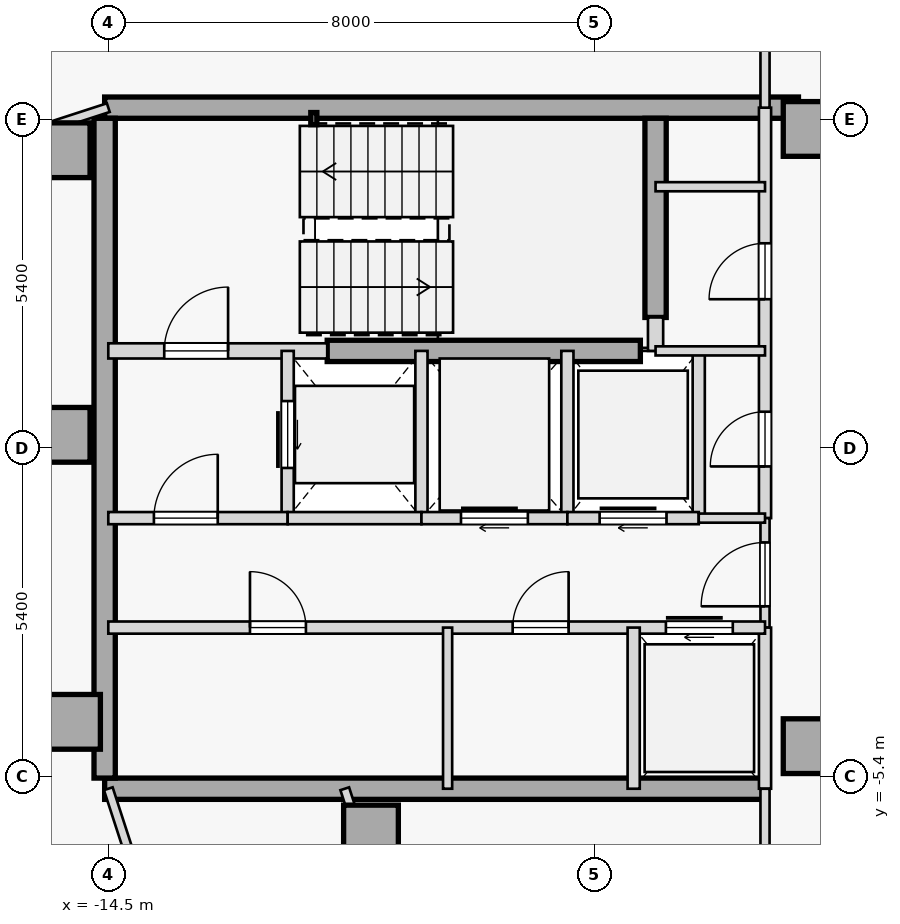
"""IFC4 building model, lengths in metres.
Left out: names, types, materials, properties, quantities, classifications, styles, units other than length and angle.
Written with IfcOpenShell. Run it as: python <this file> out.ifc"""

import sys

from ifc_helpers import new_model, si_unit, direction, frame, frame_2d, origin, origin_2d, place, context, subcontext, project, spatial, rectangle, hollow_rectangle, extrude, element, fill, save


model = new_model("IFC4")
c1 = context("Model", 3, precision=1e-05, world=origin(), true_north=direction((0.0, 1.0)))
c2 = subcontext(c1, "Body", "Model", "MODEL_VIEW")
j1 = project(units=[si_unit("LENGTHUNIT", "METRE"), si_unit("PLANEANGLEUNIT", "RADIAN")], contexts=[c1])
p1 = place(None, origin())
s1 = spatial("IfcSite", under=j1, at=p1, CompositionType="ELEMENT")
p2 = place(p1, origin())
s2 = spatial("IfcBuilding", under=s1, at=p2, CompositionType="ELEMENT")
p3 = place(p2, frame((0.0, 0.0, 231.0)))
s3 = spatial("IfcBuildingStorey", under=s2, at=p3, CompositionType="ELEMENT", Elevation=231.0)
for number, where, z_axis, x_axis in (
    (1, (-15.25, 4.9, 0.0), (0.0, 0.0, 1.0), (1.0, 0.0, 0.0)),
    (2, (-15.25, 0.22, 0.0), (0.0, 0.0, 1.0), (1.0, 0.0, 0.0)),
    (3, (-15.08, -4.5, 0.0), (0.0, 0.0, 1.0), (1.0, 0.0, 0.0)),
    (4, (-10.18, -6.32, 0.0), (0.0, 0.0, 1.0), (1.0, 0.0, 0.0)),
    (5, (-2.95, -4.9, 0.0), (0.0, 0.0, 1.0), (1.0, 0.0, 0.0)),
    (6, (-2.95, 5.25, 0.0), (0.0, 0.0, 1.0), (1.0, 0.0, 0.0)),
):
    element("IfcColumn", number, at=place(p3, frame(where, z_axis=z_axis, x_axis=x_axis)), inside=s3, PredefinedType="COLUMN", context=c2, shape_type="SweptSolid", body=[
        extrude(rectangle(XDim=0.9, YDim=0.9, at=origin_2d()), origin(), (0.0, 0.0, 1.0), 3.35),
    ])
p4 = place(p3, frame((-14.56, 5.6, 0.0), z_axis=(0.0, 0.0, 1.0), x_axis=(1.0, 0.0, 0.0)))
e7 = element("IfcWall", 7, at=p4, inside=s3, PredefinedType="SHEAR", context=c2, shape_type="SweptSolid", body=[
    extrude(rectangle(XDim=11.41, YDim=0.35, at=frame_2d((5.705, 0.0))), origin(), (0.0, 0.0, 1.0), 3.125),
])
p5 = place(p3, frame((-14.56, -5.6, 0.0), z_axis=(0.0, 0.0, 1.0), x_axis=(1.0, 0.0, 0.0)))
e8 = element("IfcWall", 8, at=p5, inside=s3, PredefinedType="SHEAR", context=c2, shape_type="SweptSolid", body=[
    extrude(rectangle(XDim=10.86, YDim=0.35, at=frame_2d((5.43, 0.0))), origin(), (0.0, 0.0, 1.0), 3.125),
])
p6 = place(p3, frame((-14.56, -5.425, 0.0), z_axis=(0.0, 0.0, 1.0), x_axis=(0.0, 1.0, 0.0)))
e9 = element("IfcWall", 9, at=p6, inside=s3, PredefinedType="SHEAR", context=c2, shape_type="SweptSolid", body=[
    extrude(rectangle(XDim=10.85, YDim=0.35, at=frame_2d((5.425, 0.0))), origin(), (0.0, 0.0, 1.0), 3.125),
])
p7 = place(p3, frame((-5.5, 2.15, 0.0), z_axis=(0.0, 0.0, 1.0), x_axis=(0.0, 1.0, 0.0)))
e10 = element("IfcWall", 10, at=p7, inside=s3, PredefinedType="SHEAR", context=c2, shape_type="SweptSolid", body=[
    extrude(rectangle(XDim=3.275, YDim=0.35, at=frame_2d((1.638, 0.0))), origin(), (0.0, 0.0, 1.0), 3.125),
])
p8 = place(p3, frame((-10.9, 1.6, 0.0), z_axis=(0.0, 0.0, 1.0), x_axis=(1.0, 0.0, 0.0)))
e11 = element("IfcWall", 11, at=p8, inside=s3, PredefinedType="SHEAR", context=c2, shape_type="SweptSolid", body=[
    extrude(rectangle(XDim=5.15, YDim=0.35, at=frame_2d((2.575, 0.0))), origin(), (0.0, 0.0, 1.0), 3.125),
])
p9 = place(p3, frame((-11.12, 5.42, 0.0), z_axis=(0.0, 0.0, 1.0), x_axis=(1.0, 0.0, 0.0)))
e12 = element("IfcColumn", 12, at=p9, inside=s3, PredefinedType="COLUMN", context=c2, shape_type="SweptSolid", body=[
    extrude(hollow_rectangle(XDim=0.1, YDim=0.2, WallThickness=0.008, at=origin_2d()), origin(), (0.0, 0.0, 1.0), 3.35),
])
p10 = place(p3, frame((-14.5, 1.6, 0.0), z_axis=(0.0, 0.0, 1.0), x_axis=(1.0, 0.0, 0.0)))
e13 = element("IfcWall", 13, at=p10, inside=s3, PredefinedType="STANDARD", context=c2, shape_type="SweptSolid", body=[
    extrude(rectangle(XDim=3.6, YDim=0.25, at=frame_2d((1.8, 0.0))), origin(), (0.0, 0.0, 1.0), 3.125),
])
p11 = place(p10, frame((0.92, 0.0, 0.0)))
e14 = element("IfcOpeningElement", 14, at=p11, cuts=e13, PredefinedType="OPENING", context=c2, shape_type="SweptSolid", body=[
    extrude(rectangle(XDim=1.05, YDim=2.15, at=frame_2d((0.525, 1.075))), frame((0.0, 0.135, 0.0), z_axis=(0.0, -1.0, 0.0), x_axis=(1.0, 0.0, 0.0)), (0.0, 0.0, 1.0), 0.27),
])
p12 = place(p3, frame((-5.5, 1.6, 0.0), z_axis=(0.0, 0.0, 1.0), x_axis=(0.0, 1.0, 0.0)))
e15 = element("IfcWall", 15, at=p12, inside=s3, PredefinedType="STANDARD", context=c2, shape_type="SweptSolid", body=[
    extrude(rectangle(XDim=0.55, YDim=0.25, at=frame_2d((0.275, 0.0))), origin(), (0.0, 0.0, 1.0), 3.125),
])
p13 = place(p3, frame((-3.7, -1.15, 0.0), z_axis=(0.0, 0.0, 1.0), x_axis=(0.0, 1.0, 0.0)))
e16 = element("IfcWall", 16, at=p13, inside=s3, PredefinedType="STANDARD", context=c2, shape_type="SweptSolid", body=[
    extrude(rectangle(XDim=6.75, YDim=0.2, at=frame_2d((3.375, 0.0))), origin(), (0.0, 0.0, 1.0), 3.125),
])
p14 = place(p13, frame((3.6, 0.0, 0.0)))
e17 = element("IfcOpeningElement", 17, at=p14, cuts=e16, PredefinedType="OPENING", context=c2, shape_type="SweptSolid", body=[
    extrude(rectangle(XDim=0.92, YDim=2.15, at=frame_2d((0.46, 1.075))), frame((0.0, 0.11, 0.0), z_axis=(0.0, -1.0, 0.0), x_axis=(1.0, 0.0, 0.0)), (0.0, 0.0, 1.0), 0.22),
])
p15 = place(p13, frame((0.85, 0.0, 0.0)))
e18 = element("IfcOpeningElement", 18, at=p15, cuts=e16, PredefinedType="OPENING", context=c2, shape_type="SweptSolid", body=[
    extrude(rectangle(XDim=0.9, YDim=2.15, at=frame_2d((0.45, 1.075))), frame((0.0, 0.11, 0.0), z_axis=(0.0, -1.0, 0.0), x_axis=(1.0, 0.0, 0.0)), (0.0, 0.0, 1.0), 0.22),
])
p16 = place(p3, frame((-3.7, -2.95, 0.0), z_axis=(0.0, 0.0, 1.0), x_axis=(0.0, 1.0, 0.0)))
e19 = element("IfcWall", 19, at=p16, inside=s3, PredefinedType="PARTITIONING", context=c2, shape_type="SweptSolid", body=[
    extrude(rectangle(XDim=1.8, YDim=0.15, at=frame_2d((0.9, 0.0))), origin(), (0.0, 0.0, 1.0), 3.125),
])
p17 = place(p16, frame((0.35, 0.0, 0.0)))
e20 = element("IfcOpeningElement", 20, at=p17, cuts=e19, PredefinedType="OPENING", context=c2, shape_type="SweptSolid", body=[
    extrude(rectangle(XDim=1.05, YDim=2.18, at=frame_2d((0.525, 1.09))), frame((0.0, 0.085, 0.0), z_axis=(0.0, -1.0, 0.0), x_axis=(1.0, 0.0, 0.0)), (0.0, 0.0, 1.0), 0.17),
])
p18 = place(p3, frame((-3.7, -5.6, 0.0), z_axis=(0.0, 0.0, 1.0), x_axis=(0.0, 1.0, 0.0)))
e21 = element("IfcWall", 21, at=p18, inside=s3, PredefinedType="STANDARD", context=c2, shape_type="SweptSolid", body=[
    extrude(rectangle(XDim=2.65, YDim=0.2, at=frame_2d((1.325, 0.0))), origin(), (0.0, 0.0, 1.0), 3.125),
])
p19 = place(p3, frame((-11.55, -1.15, 0.0), z_axis=(0.0, 0.0, 1.0), x_axis=(0.0, 1.0, 0.0)))
e22 = element("IfcWall", 22, at=p19, inside=s3, PredefinedType="STANDARD", context=c2, shape_type="SweptSolid", body=[
    extrude(rectangle(XDim=2.75, YDim=0.2, at=frame_2d((1.375, 0.0))), origin(), (0.0, 0.0, 1.0), 3.125),
])
p20 = place(p19, frame((0.825, 0.0, 0.0)))
e23 = element("IfcOpeningElement", 23, at=p20, cuts=e22, PredefinedType="OPENING", context=c2, shape_type="SweptSolid", body=[
    extrude(rectangle(XDim=1.1, YDim=2.15, at=frame_2d((0.55, 1.075))), frame((0.0, 0.11, 0.0), z_axis=(0.0, -1.0, 0.0), x_axis=(1.0, 0.0, 0.0)), (0.0, 0.0, 1.0), 0.22),
])
p21 = place(p3, frame((-9.35, -1.15, 0.0), z_axis=(0.0, 0.0, 1.0), x_axis=(0.0, 1.0, 0.0)))
e24 = element("IfcWall", 24, at=p21, inside=s3, PredefinedType="STANDARD", context=c2, shape_type="SweptSolid", body=[
    extrude(rectangle(XDim=2.75, YDim=0.2, at=frame_2d((1.375, 0.0))), origin(), (0.0, 0.0, 1.0), 3.125),
])
p22 = place(p3, frame((-14.5, -1.15, 0.0), z_axis=(0.0, 0.0, 1.0), x_axis=(1.0, 0.0, 0.0)))
e25 = element("IfcWall", 25, at=p22, inside=s3, PredefinedType="STANDARD", context=c2, shape_type="SweptSolid", body=[
    extrude(rectangle(XDim=2.95, YDim=0.2, at=frame_2d((1.475, 0.0))), origin(), (0.0, 0.0, 1.0), 3.125),
])
p23 = place(p22, frame((0.75, 0.0, 0.0)))
e26 = element("IfcOpeningElement", 26, at=p23, cuts=e25, PredefinedType="OPENING", context=c2, shape_type="SweptSolid", body=[
    extrude(rectangle(XDim=1.05, YDim=2.18, at=frame_2d((0.525, 1.09))), frame((0.0, 0.11, 0.0), z_axis=(0.0, -1.0, 0.0), x_axis=(1.0, 0.0, 0.0)), (0.0, 0.0, 1.0), 0.22),
])
p24 = place(p3, frame((-11.55, -1.15, 0.0), z_axis=(0.0, 0.0, 1.0), x_axis=(1.0, 0.0, 0.0)))
e27 = element("IfcWall", 27, at=p24, inside=s3, PredefinedType="STANDARD", context=c2, shape_type="SweptSolid", body=[
    extrude(rectangle(XDim=2.2, YDim=0.2, at=frame_2d((1.1, 0.0))), origin(), (0.0, 0.0, 1.0), 3.125),
])
p25 = place(p3, frame((-6.95, -1.15, 0.0), z_axis=(0.0, 0.0, 1.0), x_axis=(0.0, 1.0, 0.0)))
e28 = element("IfcWall", 28, at=p25, inside=s3, PredefinedType="STANDARD", context=c2, shape_type="SweptSolid", body=[
    extrude(rectangle(XDim=2.75, YDim=0.2, at=frame_2d((1.375, 0.0))), origin(), (0.0, 0.0, 1.0), 3.125),
])
p26 = place(p3, frame((-9.35, -1.15, 0.0), z_axis=(0.0, 0.0, 1.0), x_axis=(1.0, 0.0, 0.0)))
e29 = element("IfcWall", 29, at=p26, inside=s3, PredefinedType="STANDARD", context=c2, shape_type="SweptSolid", body=[
    extrude(rectangle(XDim=2.4, YDim=0.2, at=frame_2d((1.2, 0.0))), origin(), (0.0, 0.0, 1.0), 3.125),
])
p27 = place(p26, frame((0.65, 0.0, 0.0)))
e30 = element("IfcOpeningElement", 30, at=p27, cuts=e29, PredefinedType="OPENING", context=c2, shape_type="SweptSolid", body=[
    extrude(rectangle(XDim=1.1, YDim=2.15, at=frame_2d((0.55, 1.075))), frame((0.0, 0.11, 0.0), z_axis=(0.0, -1.0, 0.0), x_axis=(1.0, 0.0, 0.0)), (0.0, 0.0, 1.0), 0.22),
])
p28 = place(p3, frame((-4.79, -1.15, 0.0), z_axis=(0.0, 0.0, 1.0), x_axis=(0.0, 1.0, 0.0)))
e31 = element("IfcWall", 31, at=p28, inside=s3, PredefinedType="STANDARD", context=c2, shape_type="SweptSolid", body=[
    extrude(rectangle(XDim=2.75, YDim=0.2, at=frame_2d((1.375, 0.0))), origin(), (0.0, 0.0, 1.0), 3.125),
])
p29 = place(p3, frame((-6.95, -1.15, 0.0), z_axis=(0.0, 0.0, 1.0), x_axis=(1.0, 0.0, 0.0)))
e32 = element("IfcWall", 32, at=p29, inside=s3, PredefinedType="STANDARD", context=c2, shape_type="SweptSolid", body=[
    extrude(rectangle(XDim=2.16, YDim=0.2, at=frame_2d((1.08, 0.0))), origin(), (0.0, 0.0, 1.0), 3.125),
])
p30 = place(p29, frame((0.53, 0.0, 0.0)))
e33 = element("IfcOpeningElement", 33, at=p30, cuts=e32, PredefinedType="OPENING", context=c2, shape_type="SweptSolid", body=[
    extrude(rectangle(XDim=1.1, YDim=2.15, at=frame_2d((0.55, 1.075))), frame((0.0, 0.11, 0.0), z_axis=(0.0, -1.0, 0.0), x_axis=(1.0, 0.0, 0.0)), (0.0, 0.0, 1.0), 0.22),
])
p31 = place(p3, frame((-4.79, -1.15, 0.0), z_axis=(0.0, 0.0, 1.0), x_axis=(1.0, 0.0, 0.0)))
e34 = element("IfcWall", 34, at=p31, inside=s3, PredefinedType="PARTITIONING", context=c2, shape_type="SweptSolid", body=[
    extrude(rectangle(XDim=1.09, YDim=0.15, at=frame_2d((0.545, 0.0))), origin(), (0.0, 0.0, 1.0), 3.125),
])
p32 = place(p3, frame((-14.5, -2.95, 0.0), z_axis=(0.0, 0.0, 1.0), x_axis=(1.0, 0.0, 0.0)))
e35 = element("IfcWall", 35, at=p32, inside=s3, PredefinedType="STANDARD", context=c2, shape_type="SweptSolid", body=[
    extrude(rectangle(XDim=10.8, YDim=0.2, at=frame_2d((5.4, 0.0))), origin(), (0.0, 0.0, 1.0), 3.125),
])
p33 = place(p32, frame((9.17, 0.0, 0.0)))
e36 = element("IfcOpeningElement", 36, at=p33, cuts=e35, PredefinedType="OPENING", context=c2, shape_type="SweptSolid", body=[
    extrude(rectangle(XDim=1.1, YDim=2.15, at=frame_2d((0.55, 1.075))), frame((0.0, 0.11, 0.0), z_axis=(0.0, -1.0, 0.0), x_axis=(1.0, 0.0, 0.0)), (0.0, 0.0, 1.0), 0.22),
])
p34 = place(p32, frame((2.33, 0.0, 0.0)))
e37 = element("IfcOpeningElement", 37, at=p34, cuts=e35, PredefinedType="OPENING", context=c2, shape_type="SweptSolid", body=[
    extrude(rectangle(XDim=0.92, YDim=2.15, at=frame_2d((0.46, 1.075))), frame((0.0, 0.11, 0.0), z_axis=(0.0, -1.0, 0.0), x_axis=(1.0, 0.0, 0.0)), (0.0, 0.0, 1.0), 0.22),
])
p35 = place(p32, frame((6.65, 0.0, 0.0)))
e38 = element("IfcOpeningElement", 38, at=p35, cuts=e35, PredefinedType="OPENING", context=c2, shape_type="SweptSolid", body=[
    extrude(rectangle(XDim=0.92, YDim=2.15, at=frame_2d((0.46, 1.075))), frame((0.0, 0.11, 0.0), z_axis=(0.0, -1.0, 0.0), x_axis=(1.0, 0.0, 0.0)), (0.0, 0.0, 1.0), 0.22),
])
p36 = place(p3, frame((-5.86, -5.6, 0.0), z_axis=(0.0, 0.0, 1.0), x_axis=(0.0, 1.0, 0.0)))
e39 = element("IfcWall", 39, at=p36, inside=s3, PredefinedType="STANDARD", context=c2, shape_type="SweptSolid", body=[
    extrude(rectangle(XDim=2.65, YDim=0.2, at=frame_2d((1.325, 0.0))), origin(), (0.0, 0.0, 1.0), 3.125),
])
p37 = place(p3, frame((-8.92, -5.6, 0.0), z_axis=(0.0, 0.0, 1.0), x_axis=(0.0, 1.0, 0.0)))
e40 = element("IfcWall", 40, at=p37, inside=s3, PredefinedType="PARTITIONING", context=c2, shape_type="SweptSolid", body=[
    extrude(rectangle(XDim=2.65, YDim=0.15, at=frame_2d((1.325, 0.0))), origin(), (0.0, 0.0, 1.0), 3.125),
])
for number, where, z_axis, x_axis in (
    (41, (-5.5, 4.3, 0.0), (0.0, 0.0, 1.0), (1.0, 0.0, 0.0)),
    (42, (-5.5, 1.6, 0.0), (0.0, 0.0, 1.0), (1.0, 0.0, 0.0)),
):
    element("IfcWall", number, at=place(p3, frame(where, z_axis=z_axis, x_axis=x_axis)), inside=s3, PredefinedType="PARTITIONING", context=c2, shape_type="SweptSolid", body=[
        extrude(rectangle(XDim=1.8, YDim=0.15, at=frame_2d((0.9, 0.0))), origin(), (0.0, 0.0, 1.0), 3.125),
    ])
p38 = place(p3, frame((-3.7, -11.514, 0.0), z_axis=(0.0, 0.0, 1.0), x_axis=(-8.2572974e-05, 0.999999996591, 0.0)))
e43 = element("IfcWall", 43, at=p38, inside=s3, PredefinedType="PARTITIONING", context=c2, shape_type="SweptSolid", body=[
    extrude(rectangle(XDim=5.913, YDim=0.15, at=frame_2d((2.957, 0.0))), origin(), (0.0, 0.0, 1.0), 3.125),
])
p39 = place(p38, frame((2.497, 0.0, 0.0)))
e44 = element("IfcOpeningElement", 44, at=p39, cuts=e43, PredefinedType="OPENING", context=c2, shape_type="SweptSolid", body=[
    extrude(rectangle(XDim=0.92, YDim=2.15, at=frame_2d((0.46, 1.075))), frame((0.0, 0.085, 0.0), z_axis=(0.0, -1.0, 0.0), x_axis=(1.0, 0.0, 0.0)), (0.0, 0.0, 1.0), 0.17),
])
p40 = place(p3, frame((-17.792, 4.531, 0.0), z_axis=(0.0, 0.0, 1.0), x_axis=(0.951047546178, 0.309044600193, 0.0)))
e45 = element("IfcWall", 45, at=p40, inside=s3, PredefinedType="PARTITIONING", context=c2, shape_type="SweptSolid", body=[
    extrude(rectangle(XDim=3.461, YDim=0.15, at=frame_2d((1.73, 0.0))), origin(), (0.0, 0.0, 1.0), 3.125),
])
p41 = place(p40, frame((0.302, 0.0, 0.0)))
e46 = element("IfcOpeningElement", 46, at=p41, cuts=e45, PredefinedType="OPENING", context=c2, shape_type="SweptSolid", body=[
    extrude(rectangle(XDim=0.92, YDim=2.15, at=frame_2d((0.46, 1.075))), frame((0.0, 0.085, 0.0), z_axis=(0.0, -1.0, 0.0), x_axis=(1.0, 0.0, 0.0)), (0.0, 0.0, 1.0), 0.17),
])
p42 = place(p3, frame((-3.7, 5.6, 0.0), z_axis=(0.0, 0.0, 1.0), x_axis=(0.000139120755, 0.999999990323, 0.0)))
e47 = element("IfcWall", 47, at=p42, inside=s3, PredefinedType="PARTITIONING", context=c2, shape_type="SweptSolid", body=[
    extrude(rectangle(XDim=3.51, YDim=0.15, at=frame_2d((1.755, 0.0))), origin(), (0.0, 0.0, 1.0), 3.125),
])
p43 = place(p3, frame((-18.292, 6.072, 0.0), z_axis=(0.0, 0.0, 1.0), x_axis=(0.951062707515, 0.30899793911, 0.0)))
e48 = element("IfcWall", 48, at=p43, inside=s3, PredefinedType="PARTITIONING", context=c2, shape_type="SweptSolid", body=[
    extrude(rectangle(XDim=6.076, YDim=0.15, at=frame_2d((3.038, 0.0))), origin(), (0.0, 0.0, 1.0), 3.125),
])
p44 = place(p43, frame((0.877, 0.0, 0.0)))
e49 = element("IfcOpeningElement", 49, at=p44, cuts=e48, PredefinedType="OPENING", context=c2, shape_type="SweptSolid", body=[
    extrude(rectangle(XDim=0.92, YDim=2.15, at=frame_2d((0.46, 1.075))), frame((0.0, 0.085, 0.0), z_axis=(0.0, -1.0, 0.0), x_axis=(1.0, 0.0, 0.0)), (0.0, 0.0, 1.0), 0.17),
])
p45 = place(p3, frame((-30.663, -9.757, 0.0), z_axis=(0.0, 0.0, 1.0), x_axis=(0.951058192995, 0.309011833974, 0.0)))
e50 = element("IfcWall", 50, at=p45, inside=s3, PredefinedType="PARTITIONING", context=c2, shape_type="SweptSolid", body=[
    extrude(rectangle(XDim=16.657, YDim=0.15, at=frame_2d((8.329, 0.0))), origin(), (0.0, 0.0, 1.0), 3.125),
])
p46 = place(p3, frame((-13.488, -8.713, 0.0), z_axis=(0.0, 0.0, 1.0), x_axis=(-0.309082700143, 0.951035164687, 0.0)))
e51 = element("IfcWall", 51, at=p46, inside=s3, PredefinedType="PARTITIONING", context=c2, shape_type="SweptSolid", body=[
    extrude(rectangle(XDim=3.274, YDim=0.15, at=frame_2d((1.637, 0.0))), origin(), (0.0, 0.0, 1.0), 3.125),
])
p47 = place(p3, frame((-8.213, -12.98, 0.0), z_axis=(0.0, 0.0, 1.0), x_axis=(-0.309017065592, 0.951056493155, 0.0)))
e52 = element("IfcWall", 52, at=p47, inside=s3, PredefinedType="PARTITIONING", context=c2, shape_type="SweptSolid", body=[
    extrude(rectangle(XDim=7.76, YDim=0.15, at=frame_2d((3.88, 0.0))), origin(), (0.0, 0.0, 1.0), 3.125),
])
p48 = place(p11, origin())
e53 = element("IfcDoor", 53, at=p48, inside=s3, OperationType="SINGLE_SWING_RIGHT", PredefinedType="DOOR", context=c2, shape_type="SweptSolid", body=[
    extrude(rectangle(XDim=1.05, YDim=2.15, at=frame_2d((0.525, 1.075))), frame((0.0, 0.025, 0.0), z_axis=(0.0, -1.0, 0.0), x_axis=(1.0, 0.0, 0.0)), (0.0, 0.0, 1.0), 0.05),
])
fill(e14, e53)
p49 = place(p23, origin())
e54 = element("IfcDoor", 54, at=p49, inside=s3, OperationType="SINGLE_SWING_RIGHT", PredefinedType="DOOR", context=c2, shape_type="SweptSolid", body=[
    extrude(rectangle(XDim=1.05, YDim=2.18, at=frame_2d((0.525, 1.09))), frame((0.0, 0.025, 0.0), z_axis=(0.0, -1.0, 0.0), x_axis=(1.0, 0.0, 0.0)), (0.0, 0.0, 1.0), 0.05),
])
fill(e26, e54)
p50 = place(p17, origin())
e55 = element("IfcDoor", 55, at=p50, inside=s3, OperationType="SINGLE_SWING_LEFT", PredefinedType="DOOR", context=c2, shape_type="SweptSolid", body=[
    extrude(rectangle(XDim=1.05, YDim=2.18, at=frame_2d((0.525, 1.09))), frame((0.0, 0.025, 0.0), z_axis=(0.0, -1.0, 0.0), x_axis=(1.0, 0.0, 0.0)), (0.0, 0.0, 1.0), 0.05),
])
fill(e20, e55)
p51 = place(p20, origin())
e56 = element("IfcDoor", 56, at=p51, inside=s3, OperationType="SLIDING_TO_RIGHT", PredefinedType="DOOR", context=c2, shape_type="SweptSolid", body=[
    extrude(rectangle(XDim=1.1, YDim=2.15, at=frame_2d((0.55, 1.075))), frame((0.0, 0.025, 0.0), z_axis=(0.0, -1.0, 0.0), x_axis=(1.0, 0.0, 0.0)), (0.0, 0.0, 1.0), 0.05),
])
fill(e23, e56)
p52 = place(p27, origin())
e57 = element("IfcDoor", 57, at=p52, inside=s3, OperationType="SLIDING_TO_RIGHT", PredefinedType="DOOR", context=c2, shape_type="SweptSolid", body=[
    extrude(rectangle(XDim=1.1, YDim=2.15, at=frame_2d((0.55, 1.075))), frame((0.0, 0.025, 0.0), z_axis=(0.0, -1.0, 0.0), x_axis=(1.0, 0.0, 0.0)), (0.0, 0.0, 1.0), 0.05),
])
fill(e30, e57)
p53 = place(p30, origin())
e58 = element("IfcDoor", 58, at=p53, inside=s3, OperationType="SLIDING_TO_RIGHT", PredefinedType="DOOR", context=c2, shape_type="SweptSolid", body=[
    extrude(rectangle(XDim=1.1, YDim=2.15, at=frame_2d((0.55, 1.075))), frame((0.0, 0.025, 0.0), z_axis=(0.0, -1.0, 0.0), x_axis=(1.0, 0.0, 0.0)), (0.0, 0.0, 1.0), 0.05),
])
fill(e33, e58)
p54 = place(p33, origin())
e59 = element("IfcDoor", 59, at=p54, inside=s3, OperationType="SLIDING_TO_RIGHT", PredefinedType="DOOR", context=c2, shape_type="SweptSolid", body=[
    extrude(rectangle(XDim=1.1, YDim=2.15, at=frame_2d((0.55, 1.075))), frame((0.0, 0.025, 0.0), z_axis=(0.0, -1.0, 0.0), x_axis=(1.0, 0.0, 0.0)), (0.0, 0.0, 1.0), 0.05),
])
fill(e36, e59)
p55 = place(p34, origin())
e60 = element("IfcDoor", 60, at=p55, inside=s3, OperationType="SINGLE_SWING_LEFT", PredefinedType="DOOR", context=c2, shape_type="SweptSolid", body=[
    extrude(rectangle(XDim=0.92, YDim=2.15, at=frame_2d((0.46, 1.075))), frame((0.0, 0.025, 0.0), z_axis=(0.0, -1.0, 0.0), x_axis=(1.0, 0.0, 0.0)), (0.0, 0.0, 1.0), 0.05),
])
fill(e37, e60)
p56 = place(p35, origin())
e61 = element("IfcDoor", 61, at=p56, inside=s3, OperationType="SINGLE_SWING_RIGHT", PredefinedType="DOOR", context=c2, shape_type="SweptSolid", body=[
    extrude(rectangle(XDim=0.92, YDim=2.15, at=frame_2d((0.46, 1.075))), frame((0.0, 0.025, 0.0), z_axis=(0.0, -1.0, 0.0), x_axis=(1.0, 0.0, 0.0)), (0.0, 0.0, 1.0), 0.05),
])
fill(e38, e61)
p57 = place(p14, origin())
e62 = element("IfcDoor", 62, at=p57, inside=s3, OperationType="SINGLE_SWING_LEFT", PredefinedType="DOOR", context=c2, shape_type="SweptSolid", body=[
    extrude(rectangle(XDim=0.92, YDim=2.15, at=frame_2d((0.46, 1.075))), frame((0.0, 0.025, 0.0), z_axis=(0.0, -1.0, 0.0), x_axis=(1.0, 0.0, 0.0)), (0.0, 0.0, 1.0), 0.05),
])
fill(e17, e62)
p58 = place(p15, origin())
e63 = element("IfcDoor", 63, at=p58, inside=s3, OperationType="SINGLE_SWING_LEFT", PredefinedType="DOOR", context=c2, shape_type="SweptSolid", body=[
    extrude(rectangle(XDim=0.9, YDim=2.15, at=frame_2d((0.45, 1.075))), frame((0.0, 0.025, 0.0), z_axis=(0.0, -1.0, 0.0), x_axis=(1.0, 0.0, 0.0)), (0.0, 0.0, 1.0), 0.05),
])
fill(e18, e63)
save(model, sys.argv[1])
